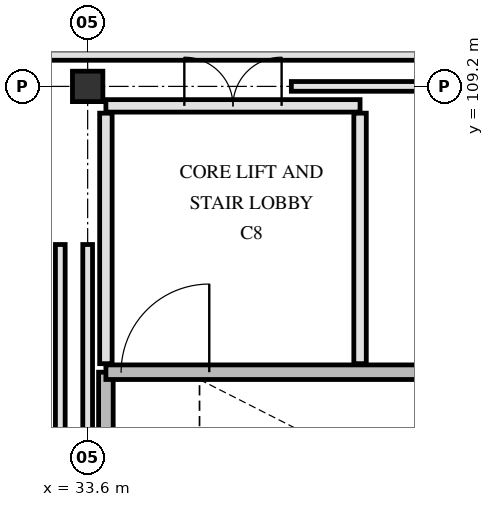
"""IFC4 building model, lengths in metres.
Left out: names, types, materials, properties, quantities, classifications, styles, units other than length and angle.
Written with IfcOpenShell. Run it as: python <this file> out.ifc"""

import sys

from ifc_helpers import new_model, si_unit, direction, frame, frame_2d, origin, origin_2d, place, context, subcontext, project, spatial, rectangle, extrude, element, fill, save


model = new_model("IFC4")
c1 = context("Model", 3, precision=1e-05, world=origin(), true_north=direction((0.0, 1.0)))
c2 = subcontext(c1, "Body", "Model", "MODEL_VIEW")
j1 = project(units=[si_unit("LENGTHUNIT", "METRE"), si_unit("PLANEANGLEUNIT", "RADIAN")], contexts=[c1])
p1 = place(None, origin())
s1 = spatial("IfcSite", under=j1, at=p1, CompositionType="ELEMENT")
p2 = place(p1, origin())
s2 = spatial("IfcBuilding", under=s1, at=p2, CompositionType="ELEMENT")
p3 = place(p2, frame((0.0, 0.0, 14.4)))
s3 = spatial("IfcBuildingStorey", under=s2, at=p3, CompositionType="ELEMENT", Elevation=14.4)
p4 = place(p3, frame((33.6, 109.2, 0.0), z_axis=(0.0, 0.0, 1.0), x_axis=(1.0, 0.0, 0.0)))
e1 = element("IfcColumn", 1, at=p4, inside=s3, PredefinedType="COLUMN", context=c2, shape_type="SweptSolid", body=[
    extrude(rectangle(XDim=0.5, YDim=0.5, at=origin_2d()), origin(), (0.0, 0.0, 1.0), 4.2),
])
p5 = place(p3, frame((41.62, 109.715, 4.18), z_axis=(0.0, 0.0, 1.0), x_axis=(-1.0, 0.0, 0.0)))
e2 = element("IfcWall", 2, at=p5, inside=s3, PredefinedType="PARAPET", context=c2, shape_type="SweptSolid", body=[
    extrude(rectangle(XDim=33.22, YDim=0.17, at=frame_2d((16.61, 0.0))), origin(), (0.0, 0.0, 1.0), 1.17),
])
p6 = place(p3, frame((33.9, 101.18, 0.0), z_axis=(0.0, 0.0, 1.0), x_axis=(0.0, 1.0, 0.0)))
e3 = element("IfcWall", 3, at=p6, inside=s3, PredefinedType="SHEAR", context=c2, shape_type="SweptSolid", body=[
    extrude(rectangle(XDim=3.32, YDim=0.24, at=frame_2d((1.66, 0.0))), origin(), (0.0, 0.0, 1.0), 3.9),
])
p7 = place(p3, frame((33.9, 104.5, 0.0), z_axis=(0.0, 0.0, 1.0), x_axis=(1.0, 0.0, 0.0)))
e4 = element("IfcWall", 4, at=p7, inside=s3, PredefinedType="SHEAR", context=c2, shape_type="SweptSolid", body=[
    extrude(rectangle(XDim=7.82, YDim=0.24, at=frame_2d((3.91, 0.0))), origin(), (0.0, 0.0, 1.0), 3.9),
])
p8 = place(p7, frame((0.25, 0.0, 0.0)))
e5 = element("IfcOpeningElement", 5, at=p8, cuts=e4, PredefinedType="OPENING", context=c2, shape_type="SweptSolid", body=[
    extrude(rectangle(XDim=1.45, YDim=2.2, at=frame_2d((0.725, 1.1))), frame((0.0, 0.13, 0.0), z_axis=(0.0, -1.0, 0.0), x_axis=(1.0, 0.0, 0.0)), (0.0, 0.0, 1.0), 0.26),
])
p9 = place(p3, frame((38.08, 104.64, 0.0), z_axis=(0.0, 0.0, 1.0), x_axis=(0.0, 1.0, 0.0)))
e6 = element("IfcWall", 6, at=p9, inside=s3, PredefinedType="PARTITIONING", context=c2, shape_type="SweptSolid", body=[
    extrude(rectangle(XDim=4.12, YDim=0.205, at=frame_2d((2.06, 0.0))), origin(), (0.0, 0.0, 1.0), 3.89),
])
p10 = place(p3, frame((33.9, 104.64, 0.0), z_axis=(0.0, 0.0, 1.0), x_axis=(0.0, 1.0, 0.0)))
e7 = element("IfcWall", 7, at=p10, inside=s3, PredefinedType="PARTITIONING", context=c2, shape_type="SweptSolid", body=[
    extrude(rectangle(XDim=4.12, YDim=0.205, at=frame_2d((2.06, 0.0))), origin(), (0.0, 0.0, 1.0), 3.33),
])
p11 = place(p3, frame((33.9, 108.88, 0.0), z_axis=(0.0, 0.0, 1.0), x_axis=(1.0, 0.0, 0.0)))
e8 = element("IfcWall", 8, at=p11, inside=s3, PredefinedType="PARTITIONING", context=c2, shape_type="SweptSolid", body=[
    extrude(rectangle(XDim=4.18, YDim=0.205, at=frame_2d((2.09, 0.0))), origin(), (0.0, 0.0, 1.0), 3.28),
])
p12 = place(p11, frame((1.29, 0.0, 0.0)))
e9 = element("IfcOpeningElement", 9, at=p12, cuts=e8, PredefinedType="OPENING", context=c2, shape_type="SweptSolid", body=[
    extrude(rectangle(XDim=1.6, YDim=2.25, at=frame_2d((0.8, 1.125))), frame((0.0, 0.113, 0.0), z_axis=(0.0, -1.0, 0.0), x_axis=(1.0, 0.0, 0.0)), (0.0, 0.0, 1.0), 0.225),
])
p13 = place(p3, frame((36.95, 109.2, 0.0), z_axis=(0.0, 0.0, 1.0), x_axis=(1.0, 0.0, 0.0)))
e10 = element("IfcWall", 10, at=p13, inside=s3, PredefinedType="PARTITIONING", context=c2, shape_type="SweptSolid", body=[
    extrude(rectangle(XDim=4.805, YDim=0.16, at=frame_2d((2.402, 0.0))), origin(), (0.0, 0.0, 1.0), 3.28),
])
p14 = place(p3, frame((33.15, 101.465, 0.0), z_axis=(0.0, 0.0, 1.0), x_axis=(0.0, 1.0, 0.0)))
e11 = element("IfcWall", 11, at=p14, inside=s3, PredefinedType="PARTITIONING", context=c2, shape_type="SweptSolid", body=[
    extrude(rectangle(XDim=5.135, YDim=0.16, at=frame_2d((2.567, 0.0))), origin(), (0.0, 0.0, 1.0), 3.89),
])
p15 = place(p3, frame((33.6, 101.045, 0.0), z_axis=(0.0, 0.0, 1.0), x_axis=(0.0, 1.0, 0.0)))
e12 = element("IfcWall", 12, at=p15, inside=s3, PredefinedType="PARTITIONING", context=c2, shape_type="SweptSolid", body=[
    extrude(rectangle(XDim=5.555, YDim=0.16, at=frame_2d((2.778, 0.0))), origin(), (0.0, 0.0, 1.0), 3.33),
])
p16 = place(p8, origin())
e13 = element("IfcDoor", 13, at=p16, inside=s3, OperationType="SINGLE_SWING_RIGHT", PredefinedType="DOOR", context=c2, shape_type="SweptSolid", body=[
    extrude(rectangle(XDim=1.45, YDim=2.2, at=frame_2d((0.725, 1.1))), frame((0.0, 0.025, 0.0), z_axis=(0.0, -1.0, 0.0), x_axis=(1.0, 0.0, 0.0)), (0.0, 0.0, 1.0), 0.05),
])
fill(e5, e13)
p17 = place(p12, origin())
e14 = element("IfcDoor", 14, at=p17, inside=s3, OperationType="DOUBLE_SWING_LEFT", PredefinedType="DOOR", context=c2, shape_type="SweptSolid", body=[
    extrude(rectangle(XDim=1.6, YDim=2.25, at=frame_2d((0.8, 1.125))), frame((0.0, 0.025, 0.0), z_axis=(0.0, -1.0, 0.0), x_axis=(1.0, 0.0, 0.0)), (0.0, 0.0, 1.0), 0.05),
])
fill(e9, e14)
save(model, sys.argv[1])
